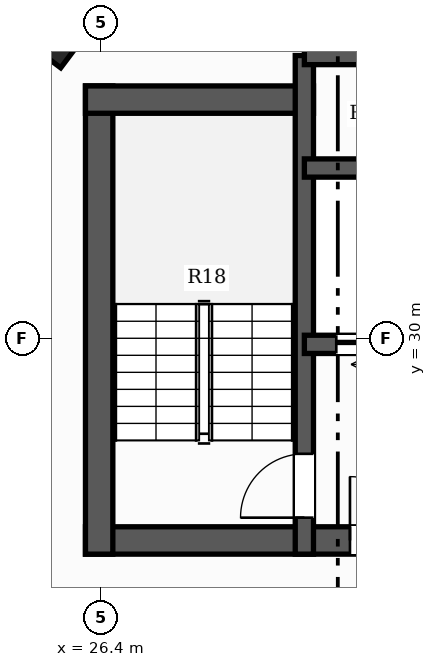
"""IFC4 building model, lengths in metres.
Left out: names, types, materials, properties, quantities, classifications, styles, units other than length and angle.
Written with IfcOpenShell. Run it as: python <this file> out.ifc"""

import sys

from ifc_helpers import new_model, si_unit, direction, frame, frame_2d, origin, origin_2d, place, context, subcontext, project, spatial, rectangle, hollow_rectangle, extrude, element, fill, save


model = new_model("IFC4")
c1 = context("Model", 3, precision=1e-05, world=origin(), true_north=direction((0.0, 1.0)))
c2 = subcontext(c1, "Body", "Model", "MODEL_VIEW")
j1 = project(units=[si_unit("LENGTHUNIT", "METRE"), si_unit("PLANEANGLEUNIT", "RADIAN")], contexts=[c1])
p1 = place(None, origin())
s1 = spatial("IfcSite", under=j1, at=p1, CompositionType="ELEMENT")
p2 = place(p1, origin())
s2 = spatial("IfcBuilding", under=s1, at=p2, CompositionType="ELEMENT")
p3 = place(p2, frame((0.0, 0.0, 23.6)))
s3 = spatial("IfcBuildingStorey", under=s2, at=p3, CompositionType="ELEMENT", Elevation=23.6)
p4 = place(p3, frame((26.15, 26.675, 0.0), z_axis=(0.0, 0.0, 1.0), x_axis=(1.0, 0.0, 0.0)))
e1 = element("IfcWall", 1, at=p4, inside=s3, PredefinedType="SHEAR", context=c2, shape_type="SweptSolid", body=[
    extrude(rectangle(XDim=13.7, YDim=0.45, at=frame_2d((6.85, 0.0))), origin(), (0.0, 0.0, 1.0), 3.3),
])
p5 = place(p4, frame((4.35, 0.0, 0.0)))
e2 = element("IfcOpeningElement", 2, at=p5, cuts=e1, PredefinedType="OPENING", context=c2, shape_type="SweptSolid", body=[
    extrude(rectangle(XDim=1.05, YDim=2.15, at=frame_2d((0.525, 1.075))), frame((0.0, 0.235, 0.0), z_axis=(0.0, -1.0, 0.0), x_axis=(1.0, 0.0, 0.0)), (0.0, 0.0, 1.0), 0.47),
])
p6 = place(p4, frame((8.3, 0.0, 0.0)))
e3 = element("IfcOpeningElement", 3, at=p6, cuts=e1, PredefinedType="OPENING", context=c2, shape_type="SweptSolid", body=[
    extrude(rectangle(XDim=1.05, YDim=2.15, at=frame_2d((0.525, 1.075))), frame((0.0, 0.235, 0.0), z_axis=(0.0, -1.0, 0.0), x_axis=(1.0, 0.0, 0.0)), (0.0, 0.0, 1.0), 0.47),
])
p7 = place(p3, frame((26.375, 26.45, 0.0), z_axis=(0.0, 0.0, 1.0), x_axis=(0.0, 1.0, 0.0)))
e4 = element("IfcWall", 4, at=p7, inside=s3, PredefinedType="SHEAR", context=c2, shape_type="SweptSolid", body=[
    extrude(rectangle(XDim=7.7, YDim=0.45, at=frame_2d((3.85, 0.0))), origin(), (0.0, 0.0, 1.0), 3.3),
])
p8 = place(p3, frame((26.15, 33.925, 0.0), z_axis=(0.0, 0.0, 1.0), x_axis=(1.0, 0.0, 0.0)))
e5 = element("IfcWall", 5, at=p8, inside=s3, PredefinedType="SHEAR", context=c2, shape_type="SweptSolid", body=[
    extrude(rectangle(XDim=3.75, YDim=0.45, at=frame_2d((1.875, 0.0))), origin(), (0.0, 0.0, 1.0), 3.3),
])
p9 = place(p3, frame((29.75, 26.45, 0.0), z_axis=(0.0, 0.0, 1.0), x_axis=(0.0, 1.0, 0.0)))
e6 = element("IfcWall", 6, at=p9, inside=s3, PredefinedType="SHEAR", context=c2, shape_type="SweptSolid", body=[
    extrude(rectangle(XDim=8.2, YDim=0.3, at=frame_2d((4.1, 0.0))), origin(), (0.0, 0.0, 1.0), 3.3),
])
p10 = place(p9, frame((0.6, 0.0, 0.0)))
e7 = element("IfcOpeningElement", 7, at=p10, cuts=e6, PredefinedType="OPENING", context=c2, shape_type="SweptSolid", body=[
    extrude(rectangle(XDim=1.05, YDim=2.15, at=frame_2d((0.525, 1.075))), frame((0.0, 0.16, 0.0), z_axis=(0.0, -1.0, 0.0), x_axis=(1.0, 0.0, 0.0)), (0.0, 0.0, 1.0), 0.32),
])
p11 = place(p3, frame((36.25, 29.9, 0.0), z_axis=(0.0, 0.0, 1.0), x_axis=(-1.0, 0.0, 0.0)))
e8 = element("IfcWall", 8, at=p11, inside=s3, PredefinedType="SHEAR", context=c2, shape_type="SweptSolid", body=[
    extrude(rectangle(XDim=6.5, YDim=0.3, at=frame_2d((3.25, 0.0))), origin(), (0.0, 0.0, 1.0), 3.3),
])
p12 = place(p11, frame((4.875, 0.0, 0.0)))
e9 = element("IfcOpeningElement", 9, at=p12, cuts=e8, PredefinedType="OPENING", context=c2, shape_type="SweptSolid", body=[
    extrude(rectangle(XDim=1.1, YDim=2.2, at=frame_2d((0.55, 1.1))), frame((0.0, 0.16, 0.0), z_axis=(0.0, -1.0, 0.0), x_axis=(1.0, 0.0, 0.0)), (0.0, 0.0, 1.0), 0.32),
])
p13 = place(p11, frame((2.875, 0.0, 0.0)))
e10 = element("IfcOpeningElement", 10, at=p13, cuts=e8, PredefinedType="OPENING", context=c2, shape_type="SweptSolid", body=[
    extrude(rectangle(XDim=1.1, YDim=2.2, at=frame_2d((0.55, 1.1))), frame((0.0, 0.16, 0.0), z_axis=(0.0, -1.0, 0.0), x_axis=(1.0, 0.0, 0.0)), (0.0, 0.0, 1.0), 0.32),
])
p14 = place(p11, frame((0.6, 0.0, 0.0)))
e11 = element("IfcOpeningElement", 11, at=p14, cuts=e8, PredefinedType="OPENING", context=c2, shape_type="SweptSolid", body=[
    extrude(rectangle(XDim=1.3, YDim=2.2, at=frame_2d((0.65, 1.1))), frame((0.0, 0.16, 0.0), z_axis=(0.0, -1.0, 0.0), x_axis=(1.0, 0.0, 0.0)), (0.0, 0.0, 1.0), 0.32),
])
p15 = place(p3, frame((29.75, 32.8, 0.0), z_axis=(0.0, 0.0, 1.0), x_axis=(1.0, 0.0, 0.0)))
e12 = element("IfcWall", 12, at=p15, inside=s3, PredefinedType="SHEAR", context=c2, shape_type="SweptSolid", body=[
    extrude(rectangle(XDim=6.5, YDim=0.3, at=frame_2d((3.25, 0.0))), origin(), (0.0, 0.0, 1.0), 3.3),
])
p16 = place(p3, frame((29.75, 34.65, 0.0), z_axis=(0.0, 0.0, 1.0), x_axis=(1.0, 0.0, 0.0)))
e13 = element("IfcWall", 13, at=p16, inside=s3, PredefinedType="SHEAR", context=c2, shape_type="SweptSolid", body=[
    extrude(rectangle(XDim=6.5, YDim=0.3, at=frame_2d((3.25, 0.0))), origin(), (0.0, 0.0, 1.0), 3.3),
])
p17 = place(p16, frame((2.84, 0.0, 0.0)))
e14 = element("IfcOpeningElement", 14, at=p17, cuts=e13, PredefinedType="OPENING", context=c2, shape_type="SweptSolid", body=[
    extrude(rectangle(XDim=0.82, YDim=2.1, at=frame_2d((0.41, 1.05))), frame((0.0, 0.16, 0.0), z_axis=(0.0, -1.0, 0.0), x_axis=(1.0, 0.0, 0.0)), (0.0, 0.0, 1.0), 0.32),
])
p18 = place(p3, frame((25.648, 35.113, 0.0), z_axis=(0.0, 0.0, 1.0), x_axis=(0.600420225326, 0.799684658487, 0.0)))
e15 = element("IfcColumn", 15, at=p18, inside=s3, PredefinedType="COLUMN", context=c2, shape_type="SweptSolid", body=[
    extrude(hollow_rectangle(XDim=0.95, YDim=0.95, WallThickness=0.032, at=origin_2d()), origin(), (0.0, 0.0, 1.0), 3.3),
])
p19 = place(p10, origin())
e16 = element("IfcDoor", 16, at=p19, inside=s3, OperationType="SINGLE_SWING_LEFT", PredefinedType="DOOR", context=c2, shape_type="SweptSolid", body=[
    extrude(rectangle(XDim=1.05, YDim=2.15, at=frame_2d((0.525, 1.075))), frame((0.0, 0.025, 0.0), z_axis=(0.0, -1.0, 0.0), x_axis=(1.0, 0.0, 0.0)), (0.0, 0.0, 1.0), 0.05),
])
fill(e7, e16)
p20 = place(p5, origin())
e17 = element("IfcDoor", 17, at=p20, inside=s3, OperationType="SINGLE_SWING_LEFT", PredefinedType="DOOR", context=c2, shape_type="SweptSolid", body=[
    extrude(rectangle(XDim=1.05, YDim=2.15, at=frame_2d((0.525, 1.075))), frame((0.0, 0.025, 0.0), z_axis=(0.0, -1.0, 0.0), x_axis=(1.0, 0.0, 0.0)), (0.0, 0.0, 1.0), 0.05),
])
fill(e2, e17)
p21 = place(p12, origin())
e18 = element("IfcDoor", 18, at=p21, inside=s3, OperationType="DOUBLE_DOOR_SLIDING", PredefinedType="DOOR", context=c2, shape_type="SweptSolid", body=[
    extrude(rectangle(XDim=1.1, YDim=2.2, at=frame_2d((0.55, 1.1))), frame((0.0, 0.025, 0.0), z_axis=(0.0, -1.0, 0.0), x_axis=(1.0, 0.0, 0.0)), (0.0, 0.0, 1.0), 0.05),
])
fill(e9, e18)
save(model, sys.argv[1])
